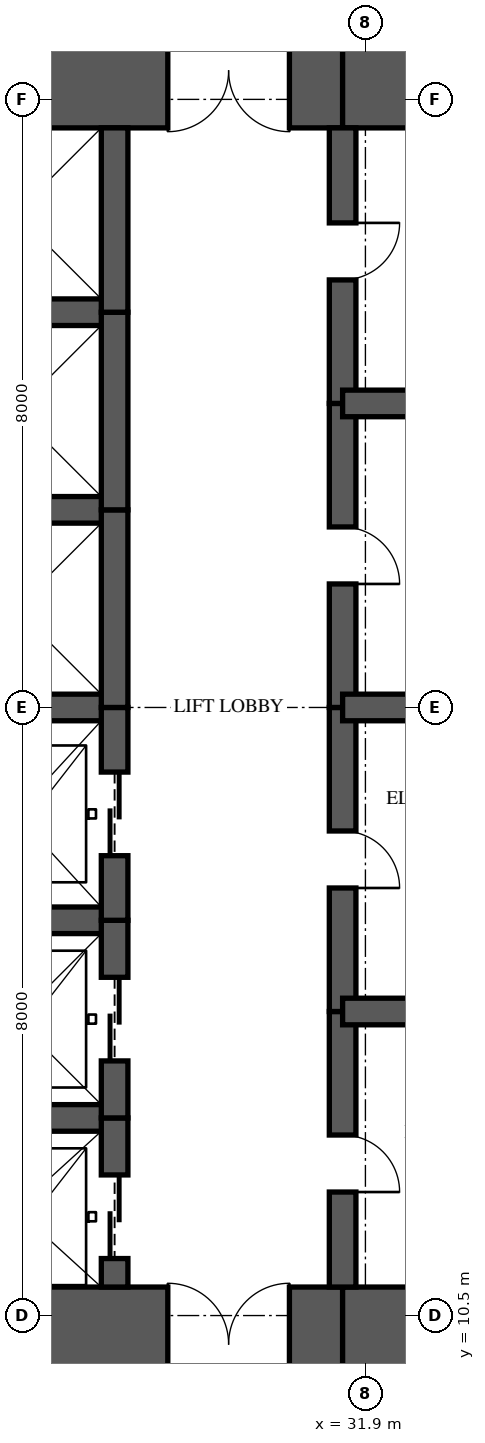
"""IFC4 building model, lengths in metres.
Left out: names, types, materials, properties, quantities, classifications, styles, units other than length and angle.
Written with IfcOpenShell. Run it as: python <this file> out.ifc"""

import sys

from ifc_helpers import new_model, si_unit, direction, frame, frame_2d, origin, place, context, subcontext, project, spatial, rectangle, extrude, element, fill, save


model = new_model("IFC4")
c1 = context("Model", 3, precision=1e-05, world=origin(), true_north=direction((0.0, 1.0)))
c2 = subcontext(c1, "Body", "Model", "MODEL_VIEW")
j1 = project(units=[si_unit("LENGTHUNIT", "METRE"), si_unit("PLANEANGLEUNIT", "RADIAN")], contexts=[c1])
p1 = place(None, origin())
s1 = spatial("IfcSite", under=j1, at=p1, CompositionType="ELEMENT")
p2 = place(p1, origin())
s2 = spatial("IfcBuilding", under=s1, at=p2, CompositionType="ELEMENT")
p3 = place(p2, frame((0.0, 0.0, 98.15)))
s3 = spatial("IfcBuildingStorey", under=s2, at=p3, CompositionType="ELEMENT", Elevation=98.15)
p4 = place(p3, frame((26.0, 10.125, 0.0), z_axis=(0.0, 0.0, 1.0), x_axis=(1.0, 0.0, 0.0)))
e1 = element("IfcWall", 1, at=p4, inside=s3, PredefinedType="SHEAR", context=c2, shape_type="SweptSolid", body=[
    extrude(rectangle(XDim=5.6, YDim=1.5, at=frame_2d((2.8, 0.0))), origin(), (0.0, 0.0, 1.0), 3.35),
])
p5 = place(p4, frame((3.3, 0.0, 0.0)))
e2 = element("IfcOpeningElement", 2, at=p5, cuts=e1, PredefinedType="OPENING", context=c2, shape_type="SweptSolid", body=[
    extrude(rectangle(XDim=1.6, YDim=2.1, at=frame_2d((0.8, 1.05))), frame((0.0, 0.76, 0.0), z_axis=(0.0, -1.0, 0.0), x_axis=(1.0, 0.0, 0.0)), (0.0, 0.0, 1.0), 1.52),
])
for number, where, z_axis, x_axis in (
    (3, (31.6, 10.125, 0.0), (0.0, 0.0, 1.0), (1.0, 0.0, 0.0)),
    (4, (35.9, 26.875, 0.0), (0.0, 0.0, 1.0), (-1.0, 0.0, 0.0)),
):
    element("IfcWall", number, at=place(p3, frame(where, z_axis=z_axis, x_axis=x_axis)), inside=s3, PredefinedType="SHEAR", context=c2, shape_type="SweptSolid", body=[
        extrude(rectangle(XDim=4.3, YDim=1.5, at=frame_2d((2.15, 0.0))), origin(), (0.0, 0.0, 1.0), 3.35),
    ])
p6 = place(p3, frame((31.6, 26.875, 0.0), z_axis=(0.0, 0.0, 1.0), x_axis=(-1.0, 0.0, 0.0)))
e5 = element("IfcWall", 5, at=p6, inside=s3, PredefinedType="SHEAR", context=c2, shape_type="SweptSolid", body=[
    extrude(rectangle(XDim=5.6, YDim=1.5, at=frame_2d((2.8, 0.0))), origin(), (0.0, 0.0, 1.0), 3.35),
])
p7 = place(p6, frame((0.7, 0.0, 0.0)))
e6 = element("IfcOpeningElement", 6, at=p7, cuts=e5, PredefinedType="OPENING", context=c2, shape_type="SweptSolid", body=[
    extrude(rectangle(XDim=1.6, YDim=2.1, at=frame_2d((0.8, 1.05))), frame((0.0, 0.76, 0.0), z_axis=(0.0, -1.0, 0.0), x_axis=(1.0, 0.0, 0.0)), (0.0, 0.0, 1.0), 1.52),
])
p8 = place(p3, frame((28.6, 10.875, 0.0), z_axis=(0.0, 0.0, 1.0), x_axis=(0.0, 1.0, 0.0)))
e7 = element("IfcWall", 7, at=p8, inside=s3, PredefinedType="SHEAR", context=c2, shape_type="SweptSolid", body=[
    extrude(rectangle(XDim=2.225, YDim=0.35, at=frame_2d((1.113, 0.0))), origin(), (0.0, 0.0, 1.0), 3.35),
])
p9 = place(p8, frame((0.375, 0.0, 0.0)))
e8 = element("IfcOpeningElement", 8, at=p9, cuts=e7, PredefinedType="OPENING", context=c2, shape_type="SweptSolid", body=[
    extrude(rectangle(XDim=1.1, YDim=2.1, at=frame_2d((0.55, 1.05))), frame((0.0, 0.185, 0.0), z_axis=(0.0, -1.0, 0.0), x_axis=(1.0, 0.0, 0.0)), (0.0, 0.0, 1.0), 0.37),
])
p10 = place(p3, frame((28.6, 13.1, 0.0), z_axis=(0.0, 0.0, 1.0), x_axis=(0.0, 1.0, 0.0)))
e9 = element("IfcWall", 9, at=p10, inside=s3, PredefinedType="SHEAR", context=c2, shape_type="SweptSolid", body=[
    extrude(rectangle(XDim=2.6, YDim=0.35, at=frame_2d((1.3, 0.0))), origin(), (0.0, 0.0, 1.0), 3.35),
])
p11 = place(p10, frame((0.75, 0.0, 0.0)))
e10 = element("IfcOpeningElement", 10, at=p11, cuts=e9, PredefinedType="OPENING", context=c2, shape_type="SweptSolid", body=[
    extrude(rectangle(XDim=1.1, YDim=2.1, at=frame_2d((0.55, 1.05))), frame((0.0, 0.185, 0.0), z_axis=(0.0, -1.0, 0.0), x_axis=(1.0, 0.0, 0.0)), (0.0, 0.0, 1.0), 0.37),
])
p12 = place(p3, frame((28.6, 15.7, 0.0), z_axis=(0.0, 0.0, 1.0), x_axis=(0.0, 1.0, 0.0)))
e11 = element("IfcWall", 11, at=p12, inside=s3, PredefinedType="SHEAR", context=c2, shape_type="SweptSolid", body=[
    extrude(rectangle(XDim=2.8, YDim=0.35, at=frame_2d((1.4, 0.0))), origin(), (0.0, 0.0, 1.0), 3.35),
])
p13 = place(p12, frame((0.85, 0.0, 0.0)))
e12 = element("IfcOpeningElement", 12, at=p13, cuts=e11, PredefinedType="OPENING", context=c2, shape_type="SweptSolid", body=[
    extrude(rectangle(XDim=1.1, YDim=2.1, at=frame_2d((0.55, 1.05))), frame((0.0, 0.185, 0.0), z_axis=(0.0, -1.0, 0.0), x_axis=(1.0, 0.0, 0.0)), (0.0, 0.0, 1.0), 0.37),
])
p14 = place(p3, frame((28.6, 18.5, 0.0), z_axis=(0.0, 0.0, 1.0), x_axis=(0.0, 1.0, 0.0)))
e13 = element("IfcWall", 13, at=p14, inside=s3, PredefinedType="SHEAR", context=c2, shape_type="SweptSolid", body=[
    extrude(rectangle(XDim=2.6, YDim=0.35, at=frame_2d((1.3, 0.0))), origin(), (0.0, 0.0, 1.0), 3.35),
])
p15 = place(p3, frame((28.6, 21.1, 0.0), z_axis=(0.0, 0.0, 1.0), x_axis=(0.0, 1.0, 0.0)))
e14 = element("IfcWall", 14, at=p15, inside=s3, PredefinedType="SHEAR", context=c2, shape_type="SweptSolid", body=[
    extrude(rectangle(XDim=2.6, YDim=0.35, at=frame_2d((1.3, 0.0))), origin(), (0.0, 0.0, 1.0), 3.35),
])
p16 = place(p3, frame((28.6, 23.7, 0.0), z_axis=(0.0, 0.0, 1.0), x_axis=(0.0, 1.0, 0.0)))
e15 = element("IfcWall", 15, at=p16, inside=s3, PredefinedType="SHEAR", context=c2, shape_type="SweptSolid", body=[
    extrude(rectangle(XDim=2.425, YDim=0.35, at=frame_2d((1.212, 0.0))), origin(), (0.0, 0.0, 1.0), 3.35),
])
p17 = place(p3, frame((31.6, 10.875, 0.0), z_axis=(0.0, 0.0, 1.0), x_axis=(0.0, 1.0, 0.0)))
e16 = element("IfcWall", 16, at=p17, inside=s3, PredefinedType="SHEAR", context=c2, shape_type="SweptSolid", body=[
    extrude(rectangle(XDim=3.625, YDim=0.35, at=frame_2d((1.812, 0.0))), origin(), (0.0, 0.0, 1.0), 3.35),
])
p18 = place(p17, frame((1.25, 0.0, 0.0)))
e17 = element("IfcOpeningElement", 17, at=p18, cuts=e16, PredefinedType="OPENING", context=c2, shape_type="SweptSolid", body=[
    extrude(rectangle(XDim=0.75, YDim=2.1, at=frame_2d((0.375, 1.05))), frame((0.0, 0.185, 0.0), z_axis=(0.0, -1.0, 0.0), x_axis=(1.0, 0.0, 0.0)), (0.0, 0.0, 1.0), 0.37),
])
p19 = place(p3, frame((31.6, 14.5, 0.0), z_axis=(0.0, 0.0, 1.0), x_axis=(0.0, 1.0, 0.0)))
e18 = element("IfcWall", 18, at=p19, inside=s3, PredefinedType="SHEAR", context=c2, shape_type="SweptSolid", body=[
    extrude(rectangle(XDim=4.0, YDim=0.35, at=frame_2d((2.0, 0.0))), origin(), (0.0, 0.0, 1.0), 3.35),
])
p20 = place(p19, frame((1.625, 0.0, 0.0)))
e19 = element("IfcOpeningElement", 19, at=p20, cuts=e18, PredefinedType="OPENING", context=c2, shape_type="SweptSolid", body=[
    extrude(rectangle(XDim=0.75, YDim=2.1, at=frame_2d((0.375, 1.05))), frame((0.0, 0.185, 0.0), z_axis=(0.0, -1.0, 0.0), x_axis=(1.0, 0.0, 0.0)), (0.0, 0.0, 1.0), 0.37),
])
p21 = place(p3, frame((31.6, 18.5, 0.0), z_axis=(0.0, 0.0, 1.0), x_axis=(0.0, 1.0, 0.0)))
e20 = element("IfcWall", 20, at=p21, inside=s3, PredefinedType="SHEAR", context=c2, shape_type="SweptSolid", body=[
    extrude(rectangle(XDim=4.0, YDim=0.35, at=frame_2d((2.0, 0.0))), origin(), (0.0, 0.0, 1.0), 3.35),
])
p22 = place(p21, frame((1.625, 0.0, 0.0)))
e21 = element("IfcOpeningElement", 21, at=p22, cuts=e20, PredefinedType="OPENING", context=c2, shape_type="SweptSolid", body=[
    extrude(rectangle(XDim=0.75, YDim=2.1, at=frame_2d((0.375, 1.05))), frame((0.0, 0.185, 0.0), z_axis=(0.0, -1.0, 0.0), x_axis=(1.0, 0.0, 0.0)), (0.0, 0.0, 1.0), 0.37),
])
p23 = place(p3, frame((31.6, 22.5, 0.0), z_axis=(0.0, 0.0, 1.0), x_axis=(0.0, 1.0, 0.0)))
e22 = element("IfcWall", 22, at=p23, inside=s3, PredefinedType="SHEAR", context=c2, shape_type="SweptSolid", body=[
    extrude(rectangle(XDim=3.625, YDim=0.35, at=frame_2d((1.812, 0.0))), origin(), (0.0, 0.0, 1.0), 3.35),
])
p24 = place(p23, frame((1.625, 0.0, 0.0)))
e23 = element("IfcOpeningElement", 23, at=p24, cuts=e22, PredefinedType="OPENING", context=c2, shape_type="SweptSolid", body=[
    extrude(rectangle(XDim=0.75, YDim=2.1, at=frame_2d((0.375, 1.05))), frame((0.0, 0.185, 0.0), z_axis=(0.0, -1.0, 0.0), x_axis=(1.0, 0.0, 0.0)), (0.0, 0.0, 1.0), 0.37),
])
for number, where, z_axis, x_axis in (
    (24, (26.0, 13.1, 0.0), (0.0, 0.0, 1.0), (1.0, 0.0, 0.0)),
    (25, (26.0, 15.7, 0.0), (0.0, 0.0, 1.0), (1.0, 0.0, 0.0)),
    (26, (26.0, 18.5, 0.0), (0.0, 0.0, 1.0), (1.0, 0.0, 0.0)),
    (27, (26.0, 21.1, 0.0), (0.0, 0.0, 1.0), (1.0, 0.0, 0.0)),
    (28, (26.0, 23.7, 0.0), (0.0, 0.0, 1.0), (1.0, 0.0, 0.0)),
):
    element("IfcWall", number, at=place(p3, frame(where, z_axis=z_axis, x_axis=x_axis)), inside=s3, PredefinedType="SHEAR", context=c2, shape_type="SweptSolid", body=[
        extrude(rectangle(XDim=2.6, YDim=0.35, at=frame_2d((1.3, 0.0))), origin(), (0.0, 0.0, 1.0), 3.35),
    ])
for number, where, z_axis, x_axis in (
    (29, (31.6, 14.5, 0.0), (0.0, 0.0, 1.0), (1.0, 0.0, 0.0)),
    (30, (31.6, 18.5, 0.0), (0.0, 0.0, 1.0), (1.0, 0.0, 0.0)),
    (31, (31.6, 22.5, 0.0), (0.0, 0.0, 1.0), (1.0, 0.0, 0.0)),
):
    element("IfcWall", number, at=place(p3, frame(where, z_axis=z_axis, x_axis=x_axis)), inside=s3, PredefinedType="SHEAR", context=c2, shape_type="SweptSolid", body=[
        extrude(rectangle(XDim=4.3, YDim=0.35, at=frame_2d((2.15, 0.0))), origin(), (0.0, 0.0, 1.0), 3.35),
    ])
p25 = place(p9, origin())
e32 = element("IfcDoor", 32, at=p25, inside=s3, OperationType="SLIDING_TO_LEFT", PredefinedType="DOOR", context=c2, shape_type="SweptSolid", body=[
    extrude(rectangle(XDim=1.1, YDim=2.1, at=frame_2d((0.55, 1.05))), frame((0.0, 0.025, 0.0), z_axis=(0.0, -1.0, 0.0), x_axis=(1.0, 0.0, 0.0)), (0.0, 0.0, 1.0), 0.05),
])
fill(e8, e32)
p26 = place(p11, origin())
e33 = element("IfcDoor", 33, at=p26, inside=s3, OperationType="SLIDING_TO_LEFT", PredefinedType="DOOR", context=c2, shape_type="SweptSolid", body=[
    extrude(rectangle(XDim=1.1, YDim=2.1, at=frame_2d((0.55, 1.05))), frame((0.0, 0.025, 0.0), z_axis=(0.0, -1.0, 0.0), x_axis=(1.0, 0.0, 0.0)), (0.0, 0.0, 1.0), 0.05),
])
fill(e10, e33)
p27 = place(p13, origin())
e34 = element("IfcDoor", 34, at=p27, inside=s3, OperationType="SLIDING_TO_LEFT", PredefinedType="DOOR", context=c2, shape_type="SweptSolid", body=[
    extrude(rectangle(XDim=1.1, YDim=2.1, at=frame_2d((0.55, 1.05))), frame((0.0, 0.025, 0.0), z_axis=(0.0, -1.0, 0.0), x_axis=(1.0, 0.0, 0.0)), (0.0, 0.0, 1.0), 0.05),
])
fill(e12, e34)
p28 = place(p5, origin())
e35 = element("IfcDoor", 35, at=p28, inside=s3, OperationType="DOUBLE_DOOR_SINGLE_SWING", PredefinedType="DOOR", context=c2, shape_type="SweptSolid", body=[
    extrude(rectangle(XDim=1.6, YDim=2.1, at=frame_2d((0.8, 1.05))), frame((0.0, 0.025, 0.0), z_axis=(0.0, -1.0, 0.0), x_axis=(1.0, 0.0, 0.0)), (0.0, 0.0, 1.0), 0.05),
])
fill(e2, e35)
p29 = place(p7, origin())
e36 = element("IfcDoor", 36, at=p29, inside=s3, OperationType="DOUBLE_DOOR_SINGLE_SWING", PredefinedType="DOOR", context=c2, shape_type="SweptSolid", body=[
    extrude(rectangle(XDim=1.6, YDim=2.1, at=frame_2d((0.8, 1.05))), frame((0.0, 0.025, 0.0), z_axis=(0.0, -1.0, 0.0), x_axis=(1.0, 0.0, 0.0)), (0.0, 0.0, 1.0), 0.05),
])
fill(e6, e36)
p30 = place(p18, frame((0.75, 0.0, 0.0), z_axis=(0.0, 0.0, 1.0), x_axis=(-1.0, 0.0, 0.0)))
e37 = element("IfcDoor", 37, at=p30, inside=s3, OperationType="SINGLE_SWING_RIGHT", PredefinedType="DOOR", context=c2, shape_type="SweptSolid", body=[
    extrude(rectangle(XDim=0.75, YDim=2.1, at=frame_2d((0.375, 1.05))), frame((0.0, 0.025, 0.0), z_axis=(0.0, -1.0, 0.0), x_axis=(1.0, 0.0, 0.0)), (0.0, 0.0, 1.0), 0.05),
])
fill(e17, e37)
p31 = place(p20, frame((0.75, 0.0, 0.0), z_axis=(0.0, 0.0, 1.0), x_axis=(-1.0, 0.0, 0.0)))
e38 = element("IfcDoor", 38, at=p31, inside=s3, OperationType="SINGLE_SWING_RIGHT", PredefinedType="DOOR", context=c2, shape_type="SweptSolid", body=[
    extrude(rectangle(XDim=0.75, YDim=2.1, at=frame_2d((0.375, 1.05))), frame((0.0, 0.025, 0.0), z_axis=(0.0, -1.0, 0.0), x_axis=(1.0, 0.0, 0.0)), (0.0, 0.0, 1.0), 0.05),
])
fill(e19, e38)
p32 = place(p22, frame((0.75, 0.0, 0.0), z_axis=(0.0, 0.0, 1.0), x_axis=(-1.0, 0.0, 0.0)))
e39 = element("IfcDoor", 39, at=p32, inside=s3, OperationType="SINGLE_SWING_RIGHT", PredefinedType="DOOR", context=c2, shape_type="SweptSolid", body=[
    extrude(rectangle(XDim=0.75, YDim=2.1, at=frame_2d((0.375, 1.05))), frame((0.0, 0.025, 0.0), z_axis=(0.0, -1.0, 0.0), x_axis=(1.0, 0.0, 0.0)), (0.0, 0.0, 1.0), 0.05),
])
fill(e21, e39)
p33 = place(p24, frame((0.75, 0.0, 0.0), z_axis=(0.0, 0.0, 1.0), x_axis=(-1.0, 0.0, 0.0)))
e40 = element("IfcDoor", 40, at=p33, inside=s3, OperationType="SINGLE_SWING_LEFT", PredefinedType="DOOR", context=c2, shape_type="SweptSolid", body=[
    extrude(rectangle(XDim=0.75, YDim=2.1, at=frame_2d((0.375, 1.05))), frame((0.0, 0.025, 0.0), z_axis=(0.0, -1.0, 0.0), x_axis=(1.0, 0.0, 0.0)), (0.0, 0.0, 1.0), 0.05),
])
fill(e23, e40)
save(model, sys.argv[1])
